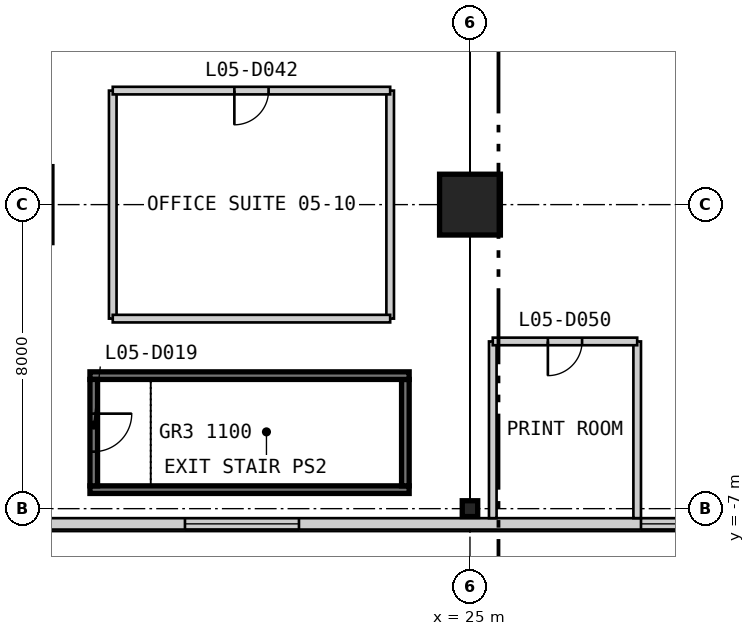
"""IFC4 building model, lengths in metres.
Left out: names, types, materials, properties, quantities, classifications, styles, units other than length and angle.
Written with IfcOpenShell. Run it as: python <this file> out.ifc"""

import sys

from ifc_helpers import new_model, si_unit, direction, frame, frame_2d, origin, origin_2d, place, context, subcontext, project, spatial, rectangle, i_section, extrude, element, fill, save


model = new_model("IFC4")
c1 = context("Model", 3, precision=1e-05, world=origin(), true_north=direction((0.0, 1.0)))
c2 = subcontext(c1, "Body", "Model", "MODEL_VIEW")
j1 = project(units=[si_unit("LENGTHUNIT", "METRE"), si_unit("PLANEANGLEUNIT", "RADIAN")], contexts=[c1])
p1 = place(None, origin())
s1 = spatial("IfcSite", under=j1, at=p1, CompositionType="ELEMENT")
p2 = place(p1, origin())
s2 = spatial("IfcBuilding", under=s1, at=p2, CompositionType="ELEMENT")
p3 = place(p2, frame((0.0, 0.0, 26.2)))
s3 = spatial("IfcBuildingStorey", under=s2, at=p3, CompositionType="ELEMENT", Elevation=26.2)
p4 = place(p3, frame((25.0, 1.0, 0.0), z_axis=(0.0, 0.0, 1.0), x_axis=(1.0, 0.0, 0.0)))
e1 = element("IfcColumn", 1, at=p4, inside=s3, PredefinedType="COLUMN", context=c2, shape_type="SweptSolid", body=[
    extrude(rectangle(XDim=1.6, YDim=1.6, at=origin_2d()), origin(), (0.0, 0.0, 1.0), 4.8),
])
p5 = place(p3, frame((25.0, -7.0, 0.0), z_axis=(0.0, 0.0, 1.0), x_axis=(1.0, 0.0, 0.0)))
e2 = element("IfcColumn", 2, at=p5, inside=s3, PredefinedType="COLUMN", context=c2, shape_type="SweptSolid", body=[
    extrude(i_section(OverallWidth=0.406, OverallDepth=0.417, WebThickness=0.03, FlangeThickness=0.048, at=origin_2d()), origin(), (0.0, 0.0, 1.0), 4.8),
])
p6 = place(p3, frame((-7.55, -7.4, 0.0), z_axis=(0.0, 0.0, 1.0), x_axis=(1.0, 0.0, 0.0)))
e3 = element("IfcWall", 3, at=p6, inside=s3, PredefinedType="SOLIDWALL", context=c2, shape_type="SweptSolid", body=[
    extrude(rectangle(XDim=65.1, YDim=0.3, at=frame_2d((32.55, 0.0))), origin(), (0.0, 0.0, 1.0), 4.5),
])
p7 = place(p6, frame((3.05, 0.0, 0.9)))
e4 = element("IfcOpeningElement", 4, at=p7, cuts=e3, PredefinedType="OPENING", context=c2, shape_type="SweptSolid", body=[
    extrude(rectangle(XDim=3.0, YDim=2.4, at=frame_2d((1.5, 1.2))), frame((0.0, 0.16, 0.0), z_axis=(0.0, -1.0, 0.0), x_axis=(1.0, 0.0, 0.0)), (0.0, 0.0, 1.0), 0.32),
])
p8 = place(p6, frame((11.05, 0.0, 0.9)))
e5 = element("IfcOpeningElement", 5, at=p8, cuts=e3, PredefinedType="OPENING", context=c2, shape_type="SweptSolid", body=[
    extrude(rectangle(XDim=3.0, YDim=2.4, at=frame_2d((1.5, 1.2))), frame((0.0, 0.16, 0.0), z_axis=(0.0, -1.0, 0.0), x_axis=(1.0, 0.0, 0.0)), (0.0, 0.0, 1.0), 0.32),
])
p9 = place(p6, frame((25.05, 0.0, 0.9)))
e6 = element("IfcOpeningElement", 6, at=p9, cuts=e3, PredefinedType="OPENING", context=c2, shape_type="SweptSolid", body=[
    extrude(rectangle(XDim=3.0, YDim=2.4, at=frame_2d((1.5, 1.2))), frame((0.0, 0.16, 0.0), z_axis=(0.0, -1.0, 0.0), x_axis=(1.0, 0.0, 0.0)), (0.0, 0.0, 1.0), 0.32),
])
p10 = place(p6, frame((37.05, 0.0, 0.9)))
e7 = element("IfcOpeningElement", 7, at=p10, cuts=e3, PredefinedType="OPENING", context=c2, shape_type="SweptSolid", body=[
    extrude(rectangle(XDim=3.0, YDim=2.4, at=frame_2d((1.5, 1.2))), frame((0.0, 0.16, 0.0), z_axis=(0.0, -1.0, 0.0), x_axis=(1.0, 0.0, 0.0)), (0.0, 0.0, 1.0), 0.32),
])
p11 = place(p6, frame((45.55, 0.0, 0.9)))
e8 = element("IfcOpeningElement", 8, at=p11, cuts=e3, PredefinedType="OPENING", context=c2, shape_type="SweptSolid", body=[
    extrude(rectangle(XDim=3.0, YDim=2.4, at=frame_2d((1.5, 1.2))), frame((0.0, 0.16, 0.0), z_axis=(0.0, -1.0, 0.0), x_axis=(1.0, 0.0, 0.0)), (0.0, 0.0, 1.0), 0.32),
])
p12 = place(p6, frame((51.55, 0.0, 0.9)))
e9 = element("IfcOpeningElement", 9, at=p12, cuts=e3, PredefinedType="OPENING", context=c2, shape_type="SweptSolid", body=[
    extrude(rectangle(XDim=3.0, YDim=2.4, at=frame_2d((1.5, 1.2))), frame((0.0, 0.16, 0.0), z_axis=(0.0, -1.0, 0.0), x_axis=(1.0, 0.0, 0.0)), (0.0, 0.0, 1.0), 0.32),
])
p13 = place(p6, frame((59.05, 0.0, 0.9)))
e10 = element("IfcOpeningElement", 10, at=p13, cuts=e3, PredefinedType="OPENING", context=c2, shape_type="SweptSolid", body=[
    extrude(rectangle(XDim=3.0, YDim=2.4, at=frame_2d((1.5, 1.2))), frame((0.0, 0.16, 0.0), z_axis=(0.0, -1.0, 0.0), x_axis=(1.0, 0.0, 0.0)), (0.0, 0.0, 1.0), 0.32),
])
p14 = place(p3, frame((15.0, -6.5, 0.0), z_axis=(0.0, 0.0, 1.0), x_axis=(1.0, 0.0, 0.0)))
e11 = element("IfcWall", 11, at=p14, inside=s3, PredefinedType="SOLIDWALL", context=c2, shape_type="SweptSolid", body=[
    extrude(rectangle(XDim=8.4, YDim=0.2, at=frame_2d((4.2, 0.0))), origin(), (0.0, 0.0, 1.0), 4.8),
])
p15 = place(p3, frame((23.3, -6.4, 0.0), z_axis=(0.0, 0.0, 1.0), x_axis=(0.0, 1.0, 0.0)))
e12 = element("IfcWall", 12, at=p15, inside=s3, PredefinedType="SOLIDWALL", context=c2, shape_type="SweptSolid", body=[
    extrude(rectangle(XDim=2.8, YDim=0.2, at=frame_2d((1.4, 0.0))), origin(), (0.0, 0.0, 1.0), 4.8),
])
p16 = place(p3, frame((23.4, -3.5, 0.0), z_axis=(0.0, 0.0, 1.0), x_axis=(-1.0, 0.0, 0.0)))
e13 = element("IfcWall", 13, at=p16, inside=s3, PredefinedType="SOLIDWALL", context=c2, shape_type="SweptSolid", body=[
    extrude(rectangle(XDim=8.4, YDim=0.2, at=frame_2d((4.2, 0.0))), origin(), (0.0, 0.0, 1.0), 4.8),
])
p17 = place(p3, frame((15.1, -3.6, 0.0), z_axis=(0.0, 0.0, 1.0), x_axis=(0.0, -1.0, 0.0)))
e14 = element("IfcWall", 14, at=p17, inside=s3, PredefinedType="SOLIDWALL", context=c2, shape_type="SweptSolid", body=[
    extrude(rectangle(XDim=2.8, YDim=0.2, at=frame_2d((1.4, 0.0))), origin(), (0.0, 0.0, 1.0), 4.8),
])
p18 = place(p17, frame((0.9, 0.0, 0.0)))
e15 = element("IfcOpeningElement", 15, at=p18, cuts=e14, PredefinedType="OPENING", context=c2, shape_type="SweptSolid", body=[
    extrude(rectangle(XDim=1.0, YDim=2.2, at=frame_2d((0.5, 1.1))), frame((0.0, 0.11, 0.0), z_axis=(0.0, -1.0, 0.0), x_axis=(1.0, 0.0, 0.0)), (0.0, 0.0, 1.0), 0.22),
])
for number, where, z_axis, x_axis in (
    (16, (15.6, -2.0, 0.0), (0.0, 0.0, 1.0), (0.0, 1.0, 0.0)),
    (17, (22.9, -2.0, 0.0), (0.0, 0.0, 1.0), (0.0, 1.0, 0.0)),
):
    element("IfcWall", number, at=place(p3, frame(where, z_axis=z_axis, x_axis=x_axis)), inside=s3, PredefinedType="PARTITIONING", context=c2, shape_type="SweptSolid", body=[
        extrude(rectangle(XDim=6.0, YDim=0.2, at=frame_2d((3.0, 0.0))), origin(), (0.0, 0.0, 1.0), 4.5),
    ])
for number, where, z_axis, x_axis in (
    (18, (25.6, -7.25, 0.0), (0.0, 0.0, 1.0), (0.0, 1.0, 0.0)),
    (19, (29.4, -7.25, 0.0), (0.0, 0.0, 1.0), (0.0, 1.0, 0.0)),
):
    element("IfcWall", number, at=place(p3, frame(where, z_axis=z_axis, x_axis=x_axis)), inside=s3, PredefinedType="PARTITIONING", context=c2, shape_type="SweptSolid", body=[
        extrude(rectangle(XDim=4.65, YDim=0.2, at=frame_2d((2.325, 0.0))), origin(), (0.0, 0.0, 1.0), 4.5),
    ])
p19 = place(p3, frame((25.6, -2.6, 0.0), z_axis=(0.0, 0.0, 1.0), x_axis=(1.0, 0.0, 0.0)))
e20 = element("IfcWall", 20, at=p19, inside=s3, PredefinedType="PARTITIONING", context=c2, shape_type="SweptSolid", body=[
    extrude(rectangle(XDim=3.8, YDim=0.2, at=frame_2d((1.9, 0.0))), origin(), (0.0, 0.0, 1.0), 4.5),
])
p20 = place(p19, frame((1.45, 0.0, 0.0)))
e21 = element("IfcOpeningElement", 21, at=p20, cuts=e20, PredefinedType="OPENING", context=c2, shape_type="SweptSolid", body=[
    extrude(rectangle(XDim=0.9, YDim=2.2, at=frame_2d((0.45, 1.1))), frame((0.0, 0.11, 0.0), z_axis=(0.0, -1.0, 0.0), x_axis=(1.0, 0.0, 0.0)), (0.0, 0.0, 1.0), 0.22),
])
p21 = place(p3, frame((15.6, -2.0, 0.0), z_axis=(0.0, 0.0, 1.0), x_axis=(1.0, 0.0, 0.0)))
e22 = element("IfcWall", 22, at=p21, inside=s3, PredefinedType="PARTITIONING", context=c2, shape_type="SweptSolid", body=[
    extrude(rectangle(XDim=7.3, YDim=0.2, at=frame_2d((3.65, 0.0))), origin(), (0.0, 0.0, 1.0), 4.5),
])
p22 = place(p3, frame((15.6, 4.0, 0.0), z_axis=(0.0, 0.0, 1.0), x_axis=(1.0, 0.0, 0.0)))
e23 = element("IfcWall", 23, at=p22, inside=s3, PredefinedType="PARTITIONING", context=c2, shape_type="SweptSolid", body=[
    extrude(rectangle(XDim=7.3, YDim=0.2, at=frame_2d((3.65, 0.0))), origin(), (0.0, 0.0, 1.0), 4.5),
])
p23 = place(p22, frame((3.2, 0.0, 0.0)))
e24 = element("IfcOpeningElement", 24, at=p23, cuts=e23, PredefinedType="OPENING", context=c2, shape_type="SweptSolid", body=[
    extrude(rectangle(XDim=0.9, YDim=2.2, at=frame_2d((0.45, 1.1))), frame((0.0, 0.11, 0.0), z_axis=(0.0, -1.0, 0.0), x_axis=(1.0, 0.0, 0.0)), (0.0, 0.0, 1.0), 0.22),
])
p24 = place(p9, origin())
e25 = element("IfcWindow", 25, at=p24, inside=s3, PartitioningType="SINGLE_PANEL", PredefinedType="WINDOW", context=c2, shape_type="SweptSolid", body=[
    extrude(rectangle(XDim=3.0, YDim=2.4, at=frame_2d((1.5, 1.2))), frame((0.0, 0.03, 0.0), z_axis=(0.0, -1.0, 0.0), x_axis=(1.0, 0.0, 0.0)), (0.0, 0.0, 1.0), 0.06),
])
fill(e6, e25)
p25 = place(p10, origin())
e26 = element("IfcWindow", 26, at=p25, inside=s3, PartitioningType="SINGLE_PANEL", PredefinedType="WINDOW", context=c2, shape_type="SweptSolid", body=[
    extrude(rectangle(XDim=3.0, YDim=2.4, at=frame_2d((1.5, 1.2))), frame((0.0, 0.03, 0.0), z_axis=(0.0, -1.0, 0.0), x_axis=(1.0, 0.0, 0.0)), (0.0, 0.0, 1.0), 0.06),
])
fill(e7, e26)
p26 = place(p18, origin())
e27 = element("IfcDoor", 27, at=p26, inside=s3, OperationType="SINGLE_SWING_LEFT", PredefinedType="DOOR", context=c2, shape_type="SweptSolid", body=[
    extrude(rectangle(XDim=1.0, YDim=2.2, at=frame_2d((0.5, 1.1))), frame((0.0, 0.025, 0.0), z_axis=(0.0, -1.0, 0.0), x_axis=(1.0, 0.0, 0.0)), (0.0, 0.0, 1.0), 0.05),
])
fill(e15, e27)
p27 = place(p23, frame((0.9, 0.0, 0.0), z_axis=(0.0, 0.0, 1.0), x_axis=(-1.0, 0.0, 0.0)))
e28 = element("IfcDoor", 28, at=p27, inside=s3, OperationType="SINGLE_SWING_RIGHT", PredefinedType="DOOR", context=c2, shape_type="SweptSolid", body=[
    extrude(rectangle(XDim=0.9, YDim=2.2, at=frame_2d((0.45, 1.1))), frame((0.0, 0.025, 0.0), z_axis=(0.0, -1.0, 0.0), x_axis=(1.0, 0.0, 0.0)), (0.0, 0.0, 1.0), 0.05),
])
fill(e24, e28)
p28 = place(p20, frame((0.9, 0.0, 0.0), z_axis=(0.0, 0.0, 1.0), x_axis=(-1.0, 0.0, 0.0)))
e29 = element("IfcDoor", 29, at=p28, inside=s3, OperationType="SINGLE_SWING_RIGHT", PredefinedType="DOOR", context=c2, shape_type="SweptSolid", body=[
    extrude(rectangle(XDim=0.9, YDim=2.2, at=frame_2d((0.45, 1.1))), frame((0.0, 0.025, 0.0), z_axis=(0.0, -1.0, 0.0), x_axis=(1.0, 0.0, 0.0)), (0.0, 0.0, 1.0), 0.05),
])
fill(e21, e29)
save(model, sys.argv[1])
